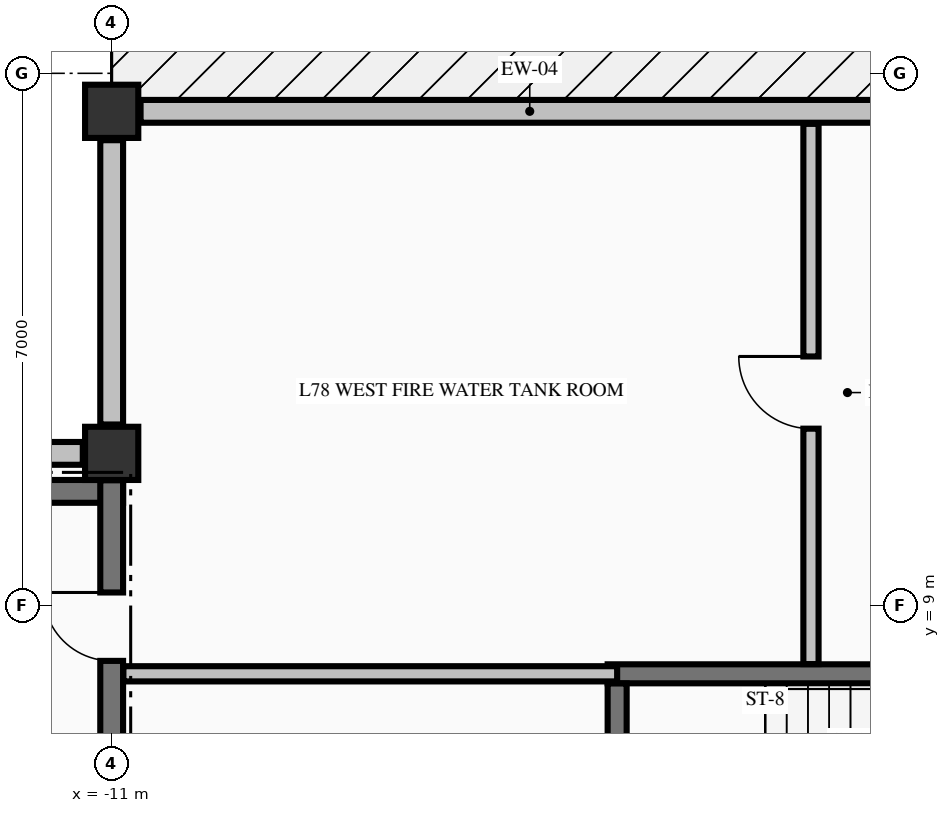
"""IFC4 building model, lengths in metres.
Left out: names, types, materials, properties, quantities, classifications, styles, units other than length and angle.
Written with IfcOpenShell. Run it as: python <this file> out.ifc"""

import sys

from ifc_helpers import new_model, si_unit, direction, frame, frame_2d, origin, origin_2d, place, context, subcontext, project, spatial, rectangle, extrude, element, fill, save


model = new_model("IFC4")
c1 = context("Model", 3, precision=1e-05, world=origin(), true_north=direction((0.0, 1.0)))
c2 = subcontext(c1, "Body", "Model", "MODEL_VIEW")
j1 = project(units=[si_unit("LENGTHUNIT", "METRE"), si_unit("PLANEANGLEUNIT", "RADIAN")], contexts=[c1])
p1 = place(None, origin())
s1 = spatial("IfcSite", under=j1, at=p1, CompositionType="ELEMENT")
p2 = place(p1, origin())
s2 = spatial("IfcBuilding", under=s1, at=p2, CompositionType="ELEMENT")
p3 = place(p2, frame((0.0, 0.0, 290.98)))
s3 = spatial("IfcBuildingStorey", under=s2, at=p3, CompositionType="ELEMENT", Elevation=290.98)
for number, where, z_axis, x_axis in (
    (1, (-11.0, 15.5, -0.325), (0.0, 0.0, 1.0), (1.0, 0.0, 0.0)),
    (2, (-11.0, 11.0, -0.325), (0.0, 0.0, 1.0), (1.0, 0.0, 0.0)),
):
    element("IfcColumn", number, at=place(p3, frame(where, z_axis=z_axis, x_axis=x_axis)), inside=s3, PredefinedType="COLUMN", context=c2, shape_type="SweptSolid", body=[
        extrude(rectangle(XDim=0.7, YDim=0.7, at=origin_2d()), origin(), (0.0, 0.0, 1.0), 3.06),
    ])
p4 = place(p3, frame((-0.38, 15.5, 0.0), z_axis=(0.0, 0.0, 1.0), x_axis=(-1.0, 0.0, 0.0)))
e3 = element("IfcWall", 3, at=p4, inside=s3, PredefinedType="STANDARD", context=c2, shape_type="SweptSolid", body=[
    extrude(rectangle(XDim=10.24, YDim=0.3, at=frame_2d((5.12, 0.0))), origin(), (0.0, 0.0, 1.0), 2.127),
])
p5 = place(p3, frame((-11.0, 15.12, 0.0), z_axis=(0.0, 0.0, 1.0), x_axis=(0.0, -1.0, 0.0)))
e4 = element("IfcWall", 4, at=p5, inside=s3, PredefinedType="STANDARD", context=c2, shape_type="SweptSolid", body=[
    extrude(rectangle(XDim=3.74, YDim=0.3, at=frame_2d((1.87, 0.0))), origin(), (0.0, 0.0, 1.0), 0.927),
])
p6 = place(p3, frame((-11.38, 11.0, 0.0), z_axis=(0.0, 0.0, 1.0), x_axis=(-1.0, 0.0, 0.0)))
e5 = element("IfcWall", 5, at=p6, inside=s3, PredefinedType="STANDARD", context=c2, shape_type="SweptSolid", body=[
    extrude(rectangle(XDim=3.74, YDim=0.3, at=frame_2d((1.87, 0.0))), origin(), (0.0, 0.0, 1.0), 1.077),
])
p7 = place(p3, frame((-4.475, 8.1, 0.0), z_axis=(0.0, 0.0, 1.0), x_axis=(1.0, 0.0, 0.0)))
e6 = element("IfcWall", 6, at=p7, inside=s3, PredefinedType="SOLIDWALL", context=c2, shape_type="SweptSolid", body=[
    extrude(rectangle(XDim=8.75, YDim=0.25, at=frame_2d((4.375, 0.0))), origin(), (0.0, 0.0, 1.0), 2.735),
])
p8 = place(p3, frame((-14.85, 10.5, 0.0), z_axis=(0.0, 0.0, 1.0), x_axis=(1.0, 0.0, 0.0)))
e7 = element("IfcWall", 7, at=p8, inside=s3, PredefinedType="SHEAR", context=c2, shape_type="SweptSolid", body=[
    extrude(rectangle(XDim=4.0, YDim=0.3, at=frame_2d((2.0, 0.0))), origin(), (0.0, 0.0, 1.0), 2.735),
])
p9 = place(p3, frame((-10.847, 8.1, 0.0), z_axis=(0.0, 0.0, 1.0), x_axis=(1.0, 0.0, 0.0)))
e8 = element("IfcWall", 8, at=p9, inside=s3, PredefinedType="PARTITIONING", context=c2, shape_type="SweptSolid", body=[
    extrude(rectangle(XDim=6.497, YDim=0.2, at=frame_2d((3.249, 0.0))), origin(), (0.0, 0.0, 1.0), 2.735),
])
p10 = place(p3, frame((-11.0, 5.852, 0.0), z_axis=(0.0, 0.0, 1.0), x_axis=(0.0, 1.0, 0.0)))
e9 = element("IfcWall", 9, at=p10, inside=s3, PredefinedType="SHEAR", context=c2, shape_type="SweptSolid", body=[
    extrude(rectangle(XDim=4.794, YDim=0.3, at=frame_2d((2.397, 0.0))), origin(), (0.0, 0.0, 1.0), 2.735),
])
p11 = place(p10, frame((2.418, 0.0, 0.0)))
e10 = element("IfcOpeningElement", 10, at=p11, cuts=e9, PredefinedType="OPENING", context=c2, shape_type="SweptSolid", body=[
    extrude(rectangle(XDim=0.9, YDim=2.15, at=frame_2d((0.45, 1.075))), frame((0.0, 0.16, 0.0), z_axis=(0.0, -1.0, 0.0), x_axis=(1.0, 0.0, 0.0)), (0.0, 0.0, 1.0), 0.32),
])
p12 = place(p3, frame((-4.35, 6.427, 0.0), z_axis=(0.0, 0.0, 1.0), x_axis=(0.0, 1.0, 0.0)))
e11 = element("IfcWall", 11, at=p12, inside=s3, PredefinedType="SOLIDWALL", context=c2, shape_type="SweptSolid", body=[
    extrude(rectangle(XDim=1.546, YDim=0.25, at=frame_2d((0.773, 0.0))), origin(), (0.0, 0.0, 1.0), 2.735),
])
p13 = place(p3, frame((-1.8, 8.228, 0.0), z_axis=(0.0, 0.0, 1.0), x_axis=(0.0, 1.0, 0.0)))
e12 = element("IfcWall", 12, at=p13, inside=s3, PredefinedType="PARTITIONING", context=c2, shape_type="SweptSolid", body=[
    extrude(rectangle(XDim=7.107, YDim=0.2, at=frame_2d((3.553, 0.0))), origin(), (0.0, 0.0, 1.0), 2.735),
])
p14 = place(p13, frame((3.097, 0.0, 0.0)))
e13 = element("IfcOpeningElement", 13, at=p14, cuts=e12, PredefinedType="OPENING", context=c2, shape_type="SweptSolid", body=[
    extrude(rectangle(XDim=0.95, YDim=2.15, at=frame_2d((0.475, 1.075))), frame((0.0, 0.11, 0.0), z_axis=(0.0, -1.0, 0.0), x_axis=(1.0, 0.0, 0.0)), (0.0, 0.0, 1.0), 0.22),
])
p15 = place(p11, origin())
e14 = element("IfcDoor", 14, at=p15, inside=s3, OperationType="SINGLE_SWING_RIGHT", PredefinedType="DOOR", context=c2, shape_type="SweptSolid", body=[
    extrude(rectangle(XDim=0.9, YDim=2.15, at=frame_2d((0.45, 1.075))), frame((0.0, 0.025, 0.0), z_axis=(0.0, -1.0, 0.0), x_axis=(1.0, 0.0, 0.0)), (0.0, 0.0, 1.0), 0.05),
])
fill(e10, e14)
p16 = place(p14, origin())
e15 = element("IfcDoor", 15, at=p16, inside=s3, OperationType="SINGLE_SWING_RIGHT", PredefinedType="DOOR", context=c2, shape_type="SweptSolid", body=[
    extrude(rectangle(XDim=0.95, YDim=2.15, at=frame_2d((0.475, 1.075))), frame((0.0, 0.025, 0.0), z_axis=(0.0, -1.0, 0.0), x_axis=(1.0, 0.0, 0.0)), (0.0, 0.0, 1.0), 0.05),
])
fill(e13, e15)
save(model, sys.argv[1])
